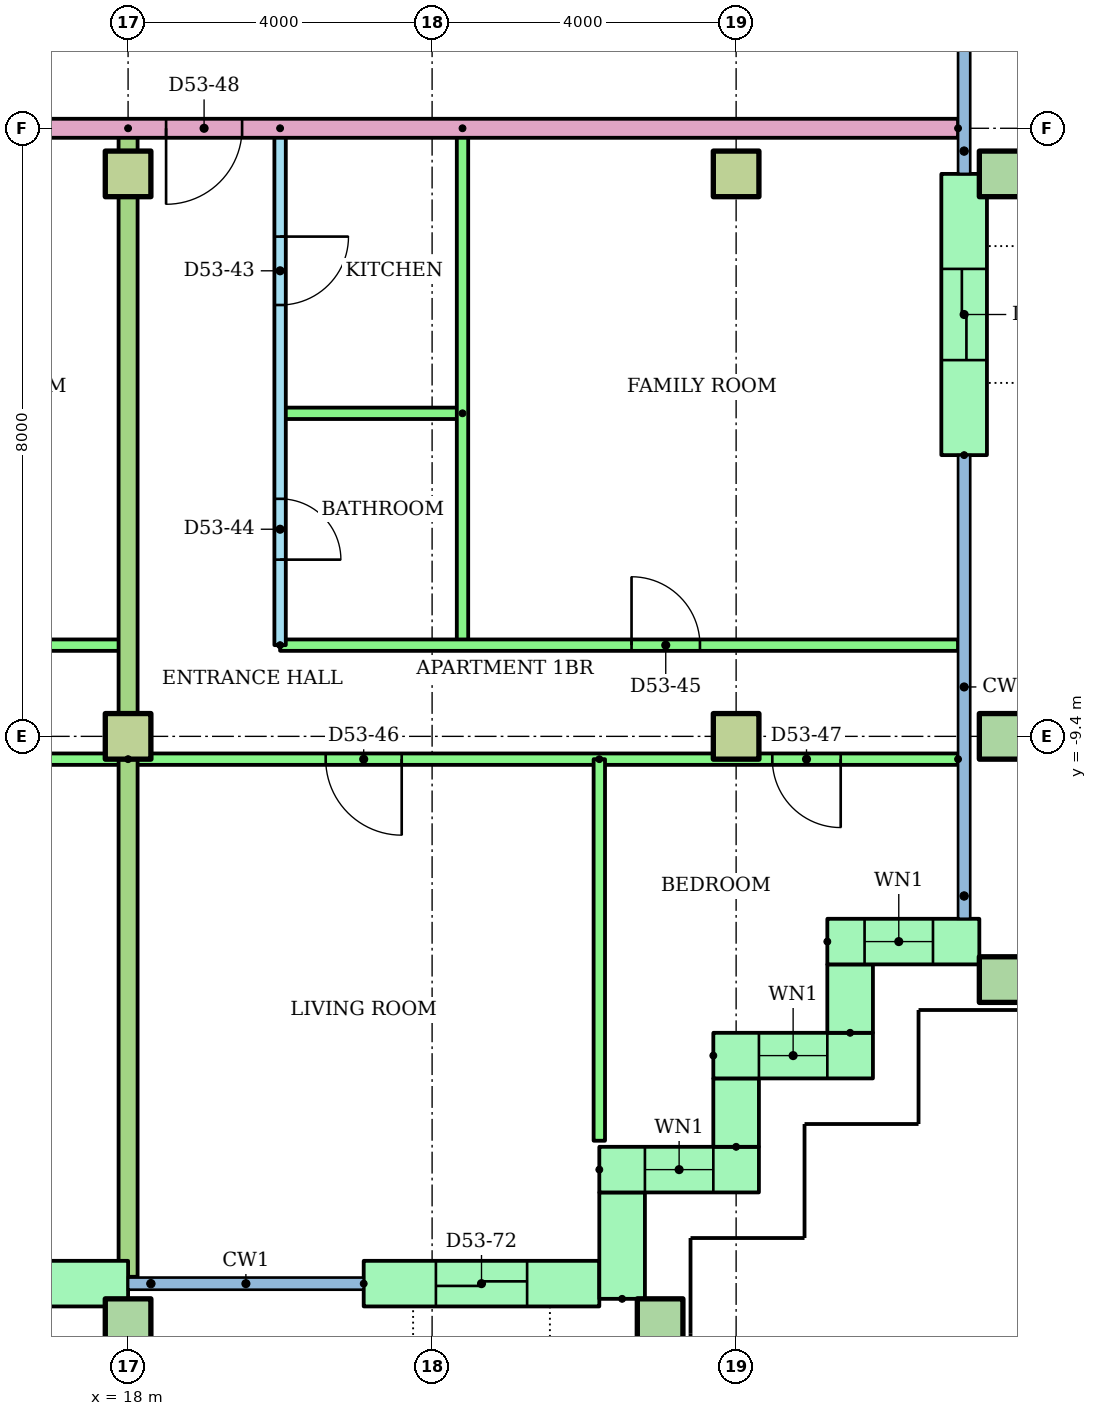
"""IFC4 building model, lengths in metres.
Left out: names, types, materials, properties, quantities, classifications, styles, units other than length and angle.
Written with IfcOpenShell. Run it as: python <this file> out.ifc"""

import sys

from ifc_helpers import new_model, si_unit, direction, frame, frame_2d, origin, origin_2d, place, context, subcontext, project, spatial, rectangle, hollow_rectangle, extrude, element, fill, save


model = new_model("IFC4")
c1 = context("Model", 3, precision=1e-05, world=origin(), true_north=direction((0.0, 1.0)))
c2 = subcontext(c1, "Body", "Model", "MODEL_VIEW")
j1 = project(units=[si_unit("LENGTHUNIT", "METRE"), si_unit("PLANEANGLEUNIT", "RADIAN")], contexts=[c1])
p1 = place(None, origin())
s1 = spatial("IfcSite", under=j1, at=p1, CompositionType="ELEMENT")
p2 = place(p1, origin())
s2 = spatial("IfcBuilding", under=s1, at=p2, CompositionType="ELEMENT")
p3 = place(p2, frame((0.0, 0.0, 207.6)))
s3 = spatial("IfcBuildingStorey", under=s2, at=p3, CompositionType="ELEMENT", Elevation=207.6)
for number, where in (
    (1, (18.0, -17.1, 0.0)),
    (2, (25.0, -17.1, 0.0)),
    (3, (29.5, -12.6, 0.0)),
):
    element("IfcColumn", number, at=place(p3, frame(where)), inside=s3, PredefinedType="COLUMN", context=c2, shape_type="SweptSolid", body=[
        extrude(hollow_rectangle(XDim=0.6, YDim=0.6, WallThickness=0.03, at=origin_2d()), origin(), (0.0, 0.0, 1.0), 3.2),
    ])
for number, where in (
    (4, (18.0, -9.4, 0.0)),
    (5, (26.0, -9.4, 0.0)),
):
    element("IfcColumn", number, at=place(p3, frame(where)), inside=s3, PredefinedType="COLUMN", context=c2, shape_type="SweptSolid", body=[
        extrude(rectangle(XDim=0.6, YDim=0.6, at=origin_2d()), origin(), (0.0, 0.0, 1.0), 3.2),
    ])
p4 = place(p3, frame((29.5, -9.4, 0.0)))
e6 = element("IfcColumn", 6, at=p4, inside=s3, PredefinedType="COLUMN", context=c2, shape_type="SweptSolid", body=[
    extrude(hollow_rectangle(XDim=0.6, YDim=0.6, WallThickness=0.03, at=origin_2d()), origin(), (0.0, 0.0, 1.0), 3.2),
])
for number, where in (
    (7, (18.0, -2.0, 0.0)),
    (8, (26.0, -2.0, 0.0)),
):
    element("IfcColumn", number, at=place(p3, frame(where)), inside=s3, PredefinedType="COLUMN", context=c2, shape_type="SweptSolid", body=[
        extrude(rectangle(XDim=0.6, YDim=0.6, at=origin_2d()), origin(), (0.0, 0.0, 1.0), 3.2),
    ])
p5 = place(p3, frame((29.5, -2.0, 0.0)))
e9 = element("IfcColumn", 9, at=p5, inside=s3, PredefinedType="COLUMN", context=c2, shape_type="SweptSolid", body=[
    extrude(hollow_rectangle(XDim=0.6, YDim=0.6, WallThickness=0.03, at=origin_2d()), origin(), (0.0, 0.0, 1.0), 3.2),
])
p6 = place(p3, frame((14.0, -16.6, 0.0)))
e10 = element("IfcWall", 10, at=p6, inside=s3, PredefinedType="STANDARD", context=c2, shape_type="SweptSolid", body=[
    extrude(rectangle(XDim=4.0, YDim=0.6, at=frame_2d((2.0, 0.0))), origin(), (0.0, 0.0, 1.0), 2.92),
])
p7 = place(p6, frame((1.4, 0.0, 0.0)))
e11 = element("IfcOpeningElement", 11, at=p7, cuts=e10, PredefinedType="OPENING", context=c2, shape_type="SweptSolid", body=[
    extrude(rectangle(XDim=1.2, YDim=2.1, at=frame_2d((0.6, 1.05))), frame((0.0, 0.31, 0.0), z_axis=(0.0, -1.0, 0.0), x_axis=(1.0, 0.0, 0.0)), (0.0, 0.0, 1.0), 0.62),
])
p8 = place(p3, frame((21.1, -16.6, 0.0)))
e12 = element("IfcWall", 12, at=p8, inside=s3, PredefinedType="STANDARD", context=c2, shape_type="SweptSolid", body=[
    extrude(rectangle(XDim=3.1, YDim=0.6, at=frame_2d((1.55, 0.0))), origin(), (0.0, 0.0, 1.0), 2.92),
])
p9 = place(p8, frame((0.95, 0.0, 0.0)))
e13 = element("IfcOpeningElement", 13, at=p9, cuts=e12, PredefinedType="OPENING", context=c2, shape_type="SweptSolid", body=[
    extrude(rectangle(XDim=1.2, YDim=2.1, at=frame_2d((0.6, 1.05))), frame((0.0, 0.31, 0.0), z_axis=(0.0, -1.0, 0.0), x_axis=(1.0, 0.0, 0.0)), (0.0, 0.0, 1.0), 0.62),
])
p10 = place(p3, frame((24.5, -16.8, 0.0), z_axis=(0.0, 0.0, 1.0), x_axis=(0.0, 1.0, 0.0)))
e14 = element("IfcWall", 14, at=p10, inside=s3, PredefinedType="STANDARD", context=c2, shape_type="SweptSolid", body=[
    extrude(rectangle(XDim=1.4, YDim=0.6, at=frame_2d((0.7, 0.0))), origin(), (0.0, 0.0, 1.0), 2.92),
])
p11 = place(p3, frame((24.2, -15.1, 0.0)))
e15 = element("IfcWall", 15, at=p11, inside=s3, PredefinedType="STANDARD", context=c2, shape_type="SweptSolid", body=[
    extrude(rectangle(XDim=2.1, YDim=0.6, at=frame_2d((1.05, 0.0))), origin(), (0.0, 0.0, 1.0), 2.92),
])
p12 = place(p11, frame((0.6, 0.0, 0.9)))
e16 = element("IfcOpeningElement", 16, at=p12, cuts=e15, PredefinedType="OPENING", context=c2, shape_type="SweptSolid", body=[
    extrude(rectangle(XDim=0.9, YDim=1.5, at=frame_2d((0.45, 0.75))), frame((0.0, 0.31, 0.0), z_axis=(0.0, -1.0, 0.0), x_axis=(1.0, 0.0, 0.0)), (0.0, 0.0, 1.0), 0.62),
])
p13 = place(p3, frame((26.0, -14.8, 0.0), z_axis=(0.0, 0.0, 1.0), x_axis=(0.0, 1.0, 0.0)))
e17 = element("IfcWall", 17, at=p13, inside=s3, PredefinedType="STANDARD", context=c2, shape_type="SweptSolid", body=[
    extrude(rectangle(XDim=0.9, YDim=0.6, at=frame_2d((0.45, 0.0))), origin(), (0.0, 0.0, 1.0), 2.92),
])
p14 = place(p3, frame((25.7, -13.6, 0.0)))
e18 = element("IfcWall", 18, at=p14, inside=s3, PredefinedType="STANDARD", context=c2, shape_type="SweptSolid", body=[
    extrude(rectangle(XDim=2.1, YDim=0.6, at=frame_2d((1.05, 0.0))), origin(), (0.0, 0.0, 1.0), 2.92),
])
p15 = place(p14, frame((0.6, 0.0, 0.9)))
e19 = element("IfcOpeningElement", 19, at=p15, cuts=e18, PredefinedType="OPENING", context=c2, shape_type="SweptSolid", body=[
    extrude(rectangle(XDim=0.9, YDim=1.5, at=frame_2d((0.45, 0.75))), frame((0.0, 0.31, 0.0), z_axis=(0.0, -1.0, 0.0), x_axis=(1.0, 0.0, 0.0)), (0.0, 0.0, 1.0), 0.62),
])
p16 = place(p3, frame((27.5, -13.3, 0.0), z_axis=(0.0, 0.0, 1.0), x_axis=(0.0, 1.0, 0.0)))
e20 = element("IfcWall", 20, at=p16, inside=s3, PredefinedType="STANDARD", context=c2, shape_type="SweptSolid", body=[
    extrude(rectangle(XDim=0.9, YDim=0.6, at=frame_2d((0.45, 0.0))), origin(), (0.0, 0.0, 1.0), 2.92),
])
p17 = place(p3, frame((27.2, -12.1, 0.0)))
e21 = element("IfcWall", 21, at=p17, inside=s3, PredefinedType="STANDARD", context=c2, shape_type="SweptSolid", body=[
    extrude(rectangle(XDim=2.0, YDim=0.6, at=frame_2d((1.0, 0.0))), origin(), (0.0, 0.0, 1.0), 2.92),
])
p18 = place(p17, frame((0.49, 0.0, 0.9)))
e22 = element("IfcOpeningElement", 22, at=p18, cuts=e21, PredefinedType="OPENING", context=c2, shape_type="SweptSolid", body=[
    extrude(rectangle(XDim=0.9, YDim=1.5, at=frame_2d((0.45, 0.75))), frame((0.0, 0.31, 0.0), z_axis=(0.0, -1.0, 0.0), x_axis=(1.0, 0.0, 0.0)), (0.0, 0.0, 1.0), 0.62),
])
p19 = place(p3, frame((29.0, -5.7, 0.0), z_axis=(0.0, 0.0, 1.0), x_axis=(0.0, 1.0, 0.0)))
e23 = element("IfcWall", 23, at=p19, inside=s3, PredefinedType="STANDARD", context=c2, shape_type="SweptSolid", body=[
    extrude(rectangle(XDim=3.7, YDim=0.6, at=frame_2d((1.85, 0.0))), origin(), (0.0, 0.0, 1.0), 2.92),
])
p20 = place(p19, frame((1.25, 0.0, 0.0)))
e24 = element("IfcOpeningElement", 24, at=p20, cuts=e23, PredefinedType="OPENING", context=c2, shape_type="SweptSolid", body=[
    extrude(rectangle(XDim=1.2, YDim=2.1, at=frame_2d((0.6, 1.05))), frame((0.0, 0.31, 0.0), z_axis=(0.0, -1.0, 0.0), x_axis=(1.0, 0.0, 0.0)), (0.0, 0.0, 1.0), 0.62),
])
p21 = place(p3, frame((12.0, -8.2, 0.0)))
e25 = element("IfcWall", 25, at=p21, inside=s3, PredefinedType="PARTITIONING", context=c2, shape_type="SweptSolid", body=[
    extrude(rectangle(XDim=6.0, YDim=0.15, at=frame_2d((3.0, 0.0))), origin(), (0.0, 0.0, 1.0), 2.4),
])
p22 = place(p21, frame((3.75, 0.0, 0.0)))
e26 = element("IfcOpeningElement", 26, at=p22, cuts=e25, PredefinedType="OPENING", context=c2, shape_type="SweptSolid", body=[
    extrude(rectangle(XDim=0.9, YDim=2.1, at=frame_2d((0.45, 1.05))), frame((0.0, 0.085, 0.0), z_axis=(0.0, -1.0, 0.0), x_axis=(1.0, 0.0, 0.0)), (0.0, 0.0, 1.0), 0.17),
])
p23 = place(p3, frame((18.0, -9.7, 0.0), z_axis=(0.0, 0.0, 1.0), x_axis=(-1.0, 0.0, 0.0)))
e27 = element("IfcWall", 27, at=p23, inside=s3, PredefinedType="PARTITIONING", context=c2, shape_type="SweptSolid", body=[
    extrude(rectangle(XDim=8.0, YDim=0.15, at=frame_2d((4.0, 0.0))), origin(), (0.0, 0.0, 1.0), 2.4),
])
p24 = place(p23, frame((5.55, 0.0, 0.0)))
e28 = element("IfcOpeningElement", 28, at=p24, cuts=e27, PredefinedType="OPENING", context=c2, shape_type="SweptSolid", body=[
    extrude(rectangle(XDim=0.9, YDim=2.1, at=frame_2d((0.45, 1.05))), frame((0.0, 0.085, 0.0), z_axis=(0.0, -1.0, 0.0), x_axis=(1.0, 0.0, 0.0)), (0.0, 0.0, 1.0), 0.17),
])
p25 = place(p23, frame((1.5, 0.0, 0.0)))
e29 = element("IfcOpeningElement", 29, at=p25, cuts=e27, PredefinedType="OPENING", context=c2, shape_type="SweptSolid", body=[
    extrude(rectangle(XDim=1.0, YDim=2.1, at=frame_2d((0.5, 1.05))), frame((0.0, 0.085, 0.0), z_axis=(0.0, -1.0, 0.0), x_axis=(1.0, 0.0, 0.0)), (0.0, 0.0, 1.0), 0.17),
])
p26 = place(p3, frame((20.0, -1.4, 0.0), z_axis=(0.0, 0.0, 1.0), x_axis=(0.0, -1.0, 0.0)))
e30 = element("IfcWall", 30, at=p26, inside=s3, PredefinedType="PARTITIONING", context=c2, shape_type="SweptSolid", body=[
    extrude(rectangle(XDim=6.8, YDim=0.15, at=frame_2d((3.4, 0.0))), origin(), (0.0, 0.0, 1.0), 2.4),
])
p27 = place(p26, frame((1.425, 0.0, 0.0)))
e31 = element("IfcOpeningElement", 31, at=p27, cuts=e30, PredefinedType="OPENING", context=c2, shape_type="SweptSolid", body=[
    extrude(rectangle(XDim=0.9, YDim=2.1, at=frame_2d((0.45, 1.05))), frame((0.0, 0.085, 0.0), z_axis=(0.0, -1.0, 0.0), x_axis=(1.0, 0.0, 0.0)), (0.0, 0.0, 1.0), 0.17),
])
p28 = place(p26, frame((4.875, 0.0, 0.0)))
e32 = element("IfcOpeningElement", 32, at=p28, cuts=e30, PredefinedType="OPENING", context=c2, shape_type="SweptSolid", body=[
    extrude(rectangle(XDim=0.8, YDim=2.1, at=frame_2d((0.4, 1.05))), frame((0.0, 0.085, 0.0), z_axis=(0.0, -1.0, 0.0), x_axis=(1.0, 0.0, 0.0)), (0.0, 0.0, 1.0), 0.17),
])
p29 = place(p3, frame((22.4, -5.15, 0.0), z_axis=(0.0, 0.0, 1.0), x_axis=(-1.0, 0.0, 0.0)))
e33 = element("IfcWall", 33, at=p29, inside=s3, PredefinedType="PARTITIONING", context=c2, shape_type="SweptSolid", body=[
    extrude(rectangle(XDim=2.4, YDim=0.15, at=frame_2d((1.2, 0.0))), origin(), (0.0, 0.0, 1.0), 2.4),
])
p30 = place(p3, frame((22.4, -1.4, 0.0), z_axis=(0.0, 0.0, 1.0), x_axis=(0.0, -1.0, 0.0)))
e34 = element("IfcWall", 34, at=p30, inside=s3, PredefinedType="PARTITIONING", context=c2, shape_type="SweptSolid", body=[
    extrude(rectangle(XDim=6.8, YDim=0.15, at=frame_2d((3.4, 0.0))), origin(), (0.0, 0.0, 1.0), 2.4),
])
p31 = place(p3, frame((20.0, -8.2, 0.0)))
e35 = element("IfcWall", 35, at=p31, inside=s3, PredefinedType="PARTITIONING", context=c2, shape_type="SweptSolid", body=[
    extrude(rectangle(XDim=8.92, YDim=0.15, at=frame_2d((4.46, 0.0))), origin(), (0.0, 0.0, 1.0), 2.4),
])
p32 = place(p31, frame((4.624, 0.0, 0.0)))
e36 = element("IfcOpeningElement", 36, at=p32, cuts=e35, PredefinedType="OPENING", context=c2, shape_type="SweptSolid", body=[
    extrude(rectangle(XDim=0.9, YDim=2.1, at=frame_2d((0.45, 1.05))), frame((0.0, 0.085, 0.0), z_axis=(0.0, -1.0, 0.0), x_axis=(1.0, 0.0, 0.0)), (0.0, 0.0, 1.0), 0.17),
])
p33 = place(p3, frame((28.92, -9.7, 0.0), z_axis=(0.0, 0.0, 1.0), x_axis=(-1.0, 0.0, 0.0)))
e37 = element("IfcWall", 37, at=p33, inside=s3, PredefinedType="PARTITIONING", context=c2, shape_type="SweptSolid", body=[
    extrude(rectangle(XDim=10.92, YDim=0.15, at=frame_2d((5.46, 0.0))), origin(), (0.0, 0.0, 1.0), 2.4),
])
p34 = place(p33, frame((7.32, 0.0, 0.0)))
e38 = element("IfcOpeningElement", 38, at=p34, cuts=e37, PredefinedType="OPENING", context=c2, shape_type="SweptSolid", body=[
    extrude(rectangle(XDim=1.0, YDim=2.1, at=frame_2d((0.5, 1.05))), frame((0.0, 0.085, 0.0), z_axis=(0.0, -1.0, 0.0), x_axis=(1.0, 0.0, 0.0)), (0.0, 0.0, 1.0), 0.17),
])
p35 = place(p33, frame((1.544, 0.0, 0.0)))
e39 = element("IfcOpeningElement", 39, at=p35, cuts=e37, PredefinedType="OPENING", context=c2, shape_type="SweptSolid", body=[
    extrude(rectangle(XDim=0.9, YDim=2.1, at=frame_2d((0.45, 1.05))), frame((0.0, 0.085, 0.0), z_axis=(0.0, -1.0, 0.0), x_axis=(1.0, 0.0, 0.0)), (0.0, 0.0, 1.0), 0.17),
])
p36 = place(p3, frame((24.2, -9.7, 0.0), z_axis=(0.0, 0.0, 1.0), x_axis=(0.0, -1.0, 0.0)))
e40 = element("IfcWall", 40, at=p36, inside=s3, PredefinedType="PARTITIONING", context=c2, shape_type="SweptSolid", body=[
    extrude(rectangle(XDim=5.02, YDim=0.15, at=frame_2d((2.51, 0.0))), origin(), (0.0, 0.0, 1.0), 2.4),
])
p37 = place(p3, frame((18.0, -1.4, 0.0), z_axis=(0.0, 0.0, 1.0), x_axis=(0.0, -1.0, 0.0)))
e41 = element("IfcWall", 41, at=p37, inside=s3, PredefinedType="PARTITIONING", context=c2, shape_type="SweptSolid", body=[
    extrude(rectangle(XDim=15.11, YDim=0.25, at=frame_2d((7.555, 0.0))), origin(), (0.0, 0.0, 1.0), 2.4),
])
p38 = place(p3, frame((28.92, -1.4, 0.0), z_axis=(0.0, 0.0, 1.0), x_axis=(-1.0, 0.0, 0.0)))
e42 = element("IfcWall", 42, at=p38, inside=s3, PredefinedType="PARTITIONING", context=c2, shape_type="SweptSolid", body=[
    extrude(rectangle(XDim=14.92, YDim=0.25, at=frame_2d((7.46, 0.0))), origin(), (0.0, 0.0, 1.0), 2.4),
])
p39 = place(p38, frame((9.42, 0.0, 0.0)))
e43 = element("IfcOpeningElement", 43, at=p39, cuts=e42, PredefinedType="OPENING", context=c2, shape_type="SweptSolid", body=[
    extrude(rectangle(XDim=1.0, YDim=2.1, at=frame_2d((0.5, 1.05))), frame((0.0, 0.135, 0.0), z_axis=(0.0, -1.0, 0.0), x_axis=(1.0, 0.0, 0.0)), (0.0, 0.0, 1.0), 0.27),
])
p40 = place(p12, origin())
e44 = element("IfcWindow", 44, at=p40, inside=s3, PartitioningType="SINGLE_PANEL", PredefinedType="WINDOW", context=c2, shape_type="SweptSolid", body=[
    extrude(rectangle(XDim=0.9, YDim=1.5, at=frame_2d((0.45, 0.75))), frame((0.0, 0.03, 0.0), z_axis=(0.0, -1.0, 0.0), x_axis=(1.0, 0.0, 0.0)), (0.0, 0.0, 1.0), 0.06),
])
fill(e16, e44)
p41 = place(p15, origin())
e45 = element("IfcWindow", 45, at=p41, inside=s3, PartitioningType="SINGLE_PANEL", PredefinedType="WINDOW", context=c2, shape_type="SweptSolid", body=[
    extrude(rectangle(XDim=0.9, YDim=1.5, at=frame_2d((0.45, 0.75))), frame((0.0, 0.03, 0.0), z_axis=(0.0, -1.0, 0.0), x_axis=(1.0, 0.0, 0.0)), (0.0, 0.0, 1.0), 0.06),
])
fill(e19, e45)
p42 = place(p18, origin())
e46 = element("IfcWindow", 46, at=p42, inside=s3, PartitioningType="SINGLE_PANEL", PredefinedType="WINDOW", context=c2, shape_type="SweptSolid", body=[
    extrude(rectangle(XDim=0.9, YDim=1.5, at=frame_2d((0.45, 0.75))), frame((0.0, 0.03, 0.0), z_axis=(0.0, -1.0, 0.0), x_axis=(1.0, 0.0, 0.0)), (0.0, 0.0, 1.0), 0.06),
])
fill(e22, e46)
p43 = place(p27, origin())
e47 = element("IfcDoor", 47, at=p43, inside=s3, OperationType="SINGLE_SWING_LEFT", PredefinedType="DOOR", context=c2, shape_type="SweptSolid", body=[
    extrude(rectangle(XDim=0.9, YDim=2.1, at=frame_2d((0.45, 1.05))), frame((0.0, 0.025, 0.0), z_axis=(0.0, -1.0, 0.0), x_axis=(1.0, 0.0, 0.0)), (0.0, 0.0, 1.0), 0.05),
])
fill(e31, e47)
p44 = place(p28, origin())
e48 = element("IfcDoor", 48, at=p44, inside=s3, OperationType="SINGLE_SWING_RIGHT", PredefinedType="DOOR", context=c2, shape_type="SweptSolid", body=[
    extrude(rectangle(XDim=0.8, YDim=2.1, at=frame_2d((0.4, 1.05))), frame((0.0, 0.025, 0.0), z_axis=(0.0, -1.0, 0.0), x_axis=(1.0, 0.0, 0.0)), (0.0, 0.0, 1.0), 0.05),
])
fill(e32, e48)
p45 = place(p32, origin())
e49 = element("IfcDoor", 49, at=p45, inside=s3, OperationType="SINGLE_SWING_LEFT", PredefinedType="DOOR", context=c2, shape_type="SweptSolid", body=[
    extrude(rectangle(XDim=0.9, YDim=2.1, at=frame_2d((0.45, 1.05))), frame((0.0, 0.025, 0.0), z_axis=(0.0, -1.0, 0.0), x_axis=(1.0, 0.0, 0.0)), (0.0, 0.0, 1.0), 0.05),
])
fill(e36, e49)
p46 = place(p34, origin())
e50 = element("IfcDoor", 50, at=p46, inside=s3, OperationType="SINGLE_SWING_LEFT", PredefinedType="DOOR", context=c2, shape_type="SweptSolid", body=[
    extrude(rectangle(XDim=1.0, YDim=2.1, at=frame_2d((0.5, 1.05))), frame((0.0, 0.025, 0.0), z_axis=(0.0, -1.0, 0.0), x_axis=(1.0, 0.0, 0.0)), (0.0, 0.0, 1.0), 0.05),
])
fill(e38, e50)
p47 = place(p35, origin())
e51 = element("IfcDoor", 51, at=p47, inside=s3, OperationType="SINGLE_SWING_LEFT", PredefinedType="DOOR", context=c2, shape_type="SweptSolid", body=[
    extrude(rectangle(XDim=0.9, YDim=2.1, at=frame_2d((0.45, 1.05))), frame((0.0, 0.025, 0.0), z_axis=(0.0, -1.0, 0.0), x_axis=(1.0, 0.0, 0.0)), (0.0, 0.0, 1.0), 0.05),
])
fill(e39, e51)
p48 = place(p39, origin())
e52 = element("IfcDoor", 52, at=p48, inside=s3, OperationType="SINGLE_SWING_RIGHT", PredefinedType="DOOR", context=c2, shape_type="SweptSolid", body=[
    extrude(rectangle(XDim=1.0, YDim=2.1, at=frame_2d((0.5, 1.05))), frame((0.0, 0.025, 0.0), z_axis=(0.0, -1.0, 0.0), x_axis=(1.0, 0.0, 0.0)), (0.0, 0.0, 1.0), 0.05),
])
fill(e43, e52)
p49 = place(p9, origin())
e53 = element("IfcDoor", 53, at=p49, inside=s3, OperationType="SLIDING_TO_LEFT", PredefinedType="DOOR", context=c2, shape_type="SweptSolid", body=[
    extrude(rectangle(XDim=1.2, YDim=2.1, at=frame_2d((0.6, 1.05))), frame((0.0, 0.025, 0.0), z_axis=(0.0, -1.0, 0.0), x_axis=(1.0, 0.0, 0.0)), (0.0, 0.0, 1.0), 0.05),
])
fill(e13, e53)
p50 = place(p20, origin())
e54 = element("IfcDoor", 54, at=p50, inside=s3, OperationType="SLIDING_TO_LEFT", PredefinedType="DOOR", context=c2, shape_type="SweptSolid", body=[
    extrude(rectangle(XDim=1.2, YDim=2.1, at=frame_2d((0.6, 1.05))), frame((0.0, 0.025, 0.0), z_axis=(0.0, -1.0, 0.0), x_axis=(1.0, 0.0, 0.0)), (0.0, 0.0, 1.0), 0.05),
])
fill(e24, e54)
save(model, sys.argv[1])
